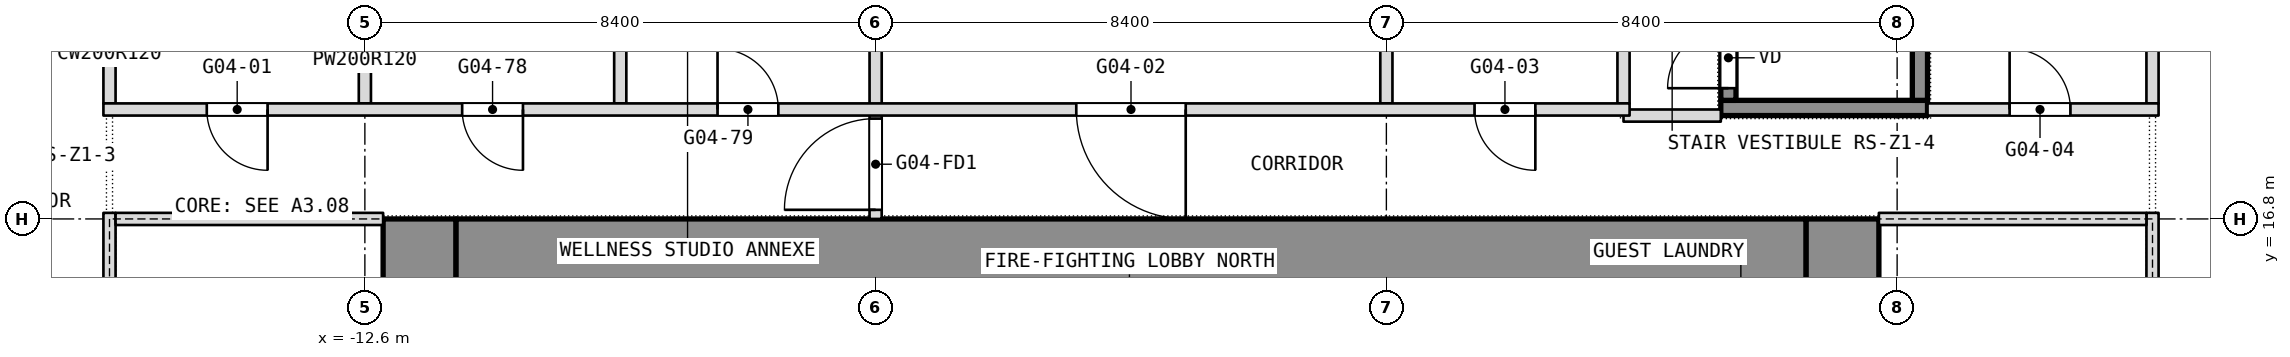
"""IFC4 building model, lengths in metres.
Left out: names, types, materials, properties, quantities, classifications, styles, units other than length and angle.
Written with IfcOpenShell. Run it as: python <this file> out.ifc"""

import sys

from ifc_helpers import new_model, si_unit, direction, frame, frame_2d, origin, place, context, subcontext, project, spatial, rectangle, extrude, element, fill, save


model = new_model("IFC4")
c1 = context("Model", 3, precision=1e-05, world=origin(), true_north=direction((0.0, 1.0)))
c2 = subcontext(c1, "Body", "Model", "MODEL_VIEW")
j1 = project(units=[si_unit("LENGTHUNIT", "METRE"), si_unit("PLANEANGLEUNIT", "RADIAN")], contexts=[c1])
p1 = place(None, origin())
s1 = spatial("IfcSite", under=j1, at=p1, CompositionType="ELEMENT")
p2 = place(p1, origin())
s2 = spatial("IfcBuilding", under=s1, at=p2, CompositionType="ELEMENT")
p3 = place(p2, frame((0.0, 0.0, 54.5)))
s3 = spatial("IfcBuildingStorey", under=s2, at=p3, CompositionType="ELEMENT", Elevation=54.5)
p4 = place(p3, frame((11.7, 0.0, 0.0), z_axis=(0.0, 0.0, 1.0), x_axis=(0.0, 1.0, 0.0)))
e1 = element("IfcWall", 1, at=p4, inside=s3, PredefinedType="SHEAR", context=c2, shape_type="SweptSolid", body=[
    extrude(rectangle(XDim=16.8, YDim=1.2, at=frame_2d((8.4, 0.0))), origin(), (0.0, 0.0, 1.0), 3.6),
])
p5 = place(p4, frame((3.6, 0.0, 0.0)))
e2 = element("IfcOpeningElement", 2, at=p5, cuts=e1, PredefinedType="OPENING", context=c2, shape_type="SweptSolid", body=[
    extrude(rectangle(XDim=0.9, YDim=2.1, at=frame_2d((0.45, 1.05))), frame((0.0, 0.6, 0.0), z_axis=(0.0, -1.0, 0.0), x_axis=(1.0, 0.0, 0.0)), (0.0, 0.0, 1.0), 1.2),
])
p6 = place(p4, frame((6.825, 0.0, 0.0)))
e3 = element("IfcOpeningElement", 3, at=p6, cuts=e1, PredefinedType="OPENING", context=c2, shape_type="SweptSolid", body=[
    extrude(rectangle(XDim=1.2, YDim=2.1, at=frame_2d((0.6, 1.05))), frame((0.0, 0.6, 0.0), z_axis=(0.0, -1.0, 0.0), x_axis=(1.0, 0.0, 0.0)), (0.0, 0.0, 1.0), 1.2),
])
p7 = place(p4, frame((12.3, 0.0, 0.0)))
e4 = element("IfcOpeningElement", 4, at=p7, cuts=e1, PredefinedType="OPENING", context=c2, shape_type="SweptSolid", body=[
    extrude(rectangle(XDim=0.9, YDim=2.1, at=frame_2d((0.45, 1.05))), frame((0.0, 0.6, 0.0), z_axis=(0.0, -1.0, 0.0), x_axis=(1.0, 0.0, 0.0)), (0.0, 0.0, 1.0), 1.2),
])
p8 = place(p4, frame((8.775, 0.0, 0.0)))
e5 = element("IfcOpeningElement", 5, at=p8, cuts=e1, PredefinedType="OPENING", context=c2, shape_type="SweptSolid", body=[
    extrude(rectangle(XDim=1.2, YDim=2.1, at=frame_2d((0.6, 1.05))), frame((0.0, 0.6, 0.0), z_axis=(0.0, -1.0, 0.0), x_axis=(1.0, 0.0, 0.0)), (0.0, 0.0, 1.0), 1.2),
])
p9 = place(p3, frame((-11.7, 0.0, 0.0), z_axis=(0.0, 0.0, 1.0), x_axis=(0.0, 1.0, 0.0)))
e6 = element("IfcWall", 6, at=p9, inside=s3, PredefinedType="SHEAR", context=c2, shape_type="SweptSolid", body=[
    extrude(rectangle(XDim=16.8, YDim=1.2, at=frame_2d((8.4, 0.0))), origin(), (0.0, 0.0, 1.0), 3.6),
])
p10 = place(p9, frame((2.3, 0.0, 0.0)))
e7 = element("IfcOpeningElement", 7, at=p10, cuts=e6, PredefinedType="OPENING", context=c2, shape_type="SweptSolid", body=[
    extrude(rectangle(XDim=1.1, YDim=2.1, at=frame_2d((0.55, 1.05))), frame((0.0, 0.6, 0.0), z_axis=(0.0, -1.0, 0.0), x_axis=(1.0, 0.0, 0.0)), (0.0, 0.0, 1.0), 1.2),
])
p11 = place(p9, frame((4.85, 0.0, 0.0)))
e8 = element("IfcOpeningElement", 8, at=p11, cuts=e6, PredefinedType="OPENING", context=c2, shape_type="SweptSolid", body=[
    extrude(rectangle(XDim=1.1, YDim=2.1, at=frame_2d((0.55, 1.05))), frame((0.0, 0.6, 0.0), z_axis=(0.0, -1.0, 0.0), x_axis=(1.0, 0.0, 0.0)), (0.0, 0.0, 1.0), 1.2),
])
p12 = place(p9, frame((6.825, 0.0, 0.0)))
e9 = element("IfcOpeningElement", 9, at=p12, cuts=e6, PredefinedType="OPENING", context=c2, shape_type="SweptSolid", body=[
    extrude(rectangle(XDim=1.2, YDim=2.1, at=frame_2d((0.6, 1.05))), frame((0.0, 0.6, 0.0), z_axis=(0.0, -1.0, 0.0), x_axis=(1.0, 0.0, 0.0)), (0.0, 0.0, 1.0), 1.2),
])
p13 = place(p9, frame((13.4, 0.0, 0.0)))
e10 = element("IfcOpeningElement", 10, at=p13, cuts=e6, PredefinedType="OPENING", context=c2, shape_type="SweptSolid", body=[
    extrude(rectangle(XDim=1.1, YDim=2.1, at=frame_2d((0.55, 1.05))), frame((0.0, 0.6, 0.0), z_axis=(0.0, -1.0, 0.0), x_axis=(1.0, 0.0, 0.0)), (0.0, 0.0, 1.0), 1.2),
])
p14 = place(p9, frame((10.85, 0.0, 0.0)))
e11 = element("IfcOpeningElement", 11, at=p14, cuts=e6, PredefinedType="OPENING", context=c2, shape_type="SweptSolid", body=[
    extrude(rectangle(XDim=1.1, YDim=2.1, at=frame_2d((0.55, 1.05))), frame((0.0, 0.6, 0.0), z_axis=(0.0, -1.0, 0.0), x_axis=(1.0, 0.0, 0.0)), (0.0, 0.0, 1.0), 1.2),
])
p15 = place(p9, frame((8.775, 0.0, 0.0)))
e12 = element("IfcOpeningElement", 12, at=p15, cuts=e6, PredefinedType="OPENING", context=c2, shape_type="SweptSolid", body=[
    extrude(rectangle(XDim=1.2, YDim=2.1, at=frame_2d((0.6, 1.05))), frame((0.0, 0.6, 0.0), z_axis=(0.0, -1.0, 0.0), x_axis=(1.0, 0.0, 0.0)), (0.0, 0.0, 1.0), 1.2),
])
p16 = place(p3, frame((-11.1, 16.2, 0.0), z_axis=(0.0, 0.0, 1.0), x_axis=(1.0, 0.0, 0.0)))
e13 = element("IfcWall", 13, at=p16, inside=s3, PredefinedType="SHEAR", context=c2, shape_type="SweptSolid", body=[
    extrude(rectangle(XDim=22.2, YDim=1.2, at=frame_2d((11.1, 0.0))), origin(), (0.0, 0.0, 1.0), 3.6),
])
p17 = place(p3, frame((16.8, 18.7, 0.0), z_axis=(0.0, 0.0, 1.0), x_axis=(0.0, 1.0, 0.0)))
e14 = element("IfcWall", 14, at=p17, inside=s3, PredefinedType="PARTITIONING", context=c2, shape_type="SweptSolid", body=[
    extrude(rectangle(XDim=3.0, YDim=0.2, at=frame_2d((1.5, 0.0))), origin(), (0.0, 0.0, 1.0), 3.34),
])
for number, where, z_axis, x_axis in (
    (15, (8.1, 18.7, 0.0), (0.0, 0.0, 1.0), (0.0, 1.0, 0.0)),
    (16, (4.2, 18.7, 0.0), (0.0, 0.0, 1.0), (0.0, 1.0, 0.0)),
):
    element("IfcWall", number, at=place(p3, frame(where, z_axis=z_axis, x_axis=x_axis)), inside=s3, PredefinedType="PARTITIONING", context=c2, shape_type="SweptSolid", body=[
        extrude(rectangle(XDim=2.8, YDim=0.2, at=frame_2d((1.4, 0.0))), origin(), (0.0, 0.0, 1.0), 3.34),
    ])
p18 = place(p3, frame((-4.2, 16.8, 0.0), z_axis=(0.0, 0.0, 1.0), x_axis=(0.0, 1.0, 0.0)))
e17 = element("IfcWall", 17, at=p18, inside=s3, PredefinedType="PARTITIONING", context=c2, shape_type="SweptSolid", body=[
    extrude(rectangle(XDim=6.7, YDim=0.2, at=frame_2d((3.35, 0.0))), origin(), (0.0, 0.0, 1.0), 3.34),
])
p19 = place(p18, frame((0.15, 0.0, 0.0)))
e18 = element("IfcOpeningElement", 18, at=p19, cuts=e17, PredefinedType="OPENING", context=c2, shape_type="SweptSolid", body=[
    extrude(rectangle(XDim=1.5, YDim=2.1, at=frame_2d((0.75, 1.05))), frame((0.0, 0.1, 0.0), z_axis=(0.0, -1.0, 0.0), x_axis=(1.0, 0.0, 0.0)), (0.0, 0.0, 1.0), 0.2),
])
p20 = place(p18, frame((4.95, 0.0, 0.0)))
e19 = element("IfcOpeningElement", 19, at=p20, cuts=e17, PredefinedType="OPENING", context=c2, shape_type="SweptSolid", body=[
    extrude(rectangle(XDim=1.5, YDim=2.1, at=frame_2d((0.75, 1.05))), frame((0.0, 0.1, 0.0), z_axis=(0.0, -1.0, 0.0), x_axis=(1.0, 0.0, 0.0)), (0.0, 0.0, 1.0), 0.2),
])
for number, where, z_axis, x_axis in (
    (20, (-8.4, 18.7, 0.0), (0.0, 0.0, 1.0), (0.0, 1.0, 0.0)),
    (21, (-12.6, 18.7, 0.0), (0.0, 0.0, 1.0), (0.0, 1.0, 0.0)),
):
    element("IfcWall", number, at=place(p3, frame(where, z_axis=z_axis, x_axis=x_axis)), inside=s3, PredefinedType="PARTITIONING", context=c2, shape_type="SweptSolid", body=[
        extrude(rectangle(XDim=2.8, YDim=0.2, at=frame_2d((1.4, 0.0))), origin(), (0.0, 0.0, 1.0), 3.34),
    ])
p21 = place(p3, frame((-16.8, 18.7, 0.0), z_axis=(0.0, 0.0, 1.0), x_axis=(0.0, 1.0, 0.0)))
e22 = element("IfcWall", 22, at=p21, inside=s3, PredefinedType="PARTITIONING", context=c2, shape_type="SweptSolid", body=[
    extrude(rectangle(XDim=3.0, YDim=0.2, at=frame_2d((1.5, 0.0))), origin(), (0.0, 0.0, 1.0), 3.34),
])
p22 = place(p3, frame((8.1, 18.5, 0.0), z_axis=(0.0, 0.0, 1.0), x_axis=(1.0, 0.0, 0.0)))
e23 = element("IfcWall", 23, at=p22, inside=s3, PredefinedType="PARTITIONING", context=c2, shape_type="SweptSolid", body=[
    extrude(rectangle(XDim=1.6, YDim=0.2, at=frame_2d((0.8, 0.0))), origin(), (0.0, 0.0, 1.0), 3.34),
])
p23 = place(p3, frame((-16.9, 18.6, 0.0), z_axis=(0.0, 0.0, 1.0), x_axis=(1.0, 0.0, 0.0)))
e24 = element("IfcWall", 24, at=p23, inside=s3, PredefinedType="PARTITIONING", context=c2, shape_type="SweptSolid", body=[
    extrude(rectangle(XDim=25.1, YDim=0.2, at=frame_2d((12.55, 0.0))), origin(), (0.0, 0.0, 1.0), 3.34),
])
p24 = place(p23, frame((1.7, 0.0, 0.0)))
e25 = element("IfcOpeningElement", 25, at=p24, cuts=e24, PredefinedType="OPENING", context=c2, shape_type="SweptSolid", body=[
    extrude(rectangle(XDim=1.0, YDim=2.1, at=frame_2d((0.5, 1.05))), frame((0.0, 0.1, 0.0), z_axis=(0.0, -1.0, 0.0), x_axis=(1.0, 0.0, 0.0)), (0.0, 0.0, 1.0), 0.2),
])
p25 = place(p23, frame((16.0, 0.0, 0.0)))
e26 = element("IfcOpeningElement", 26, at=p25, cuts=e24, PredefinedType="OPENING", context=c2, shape_type="SweptSolid", body=[
    extrude(rectangle(XDim=1.8, YDim=2.1, at=frame_2d((0.9, 1.05))), frame((0.0, 0.1, 0.0), z_axis=(0.0, -1.0, 0.0), x_axis=(1.0, 0.0, 0.0)), (0.0, 0.0, 1.0), 0.2),
])
p26 = place(p23, frame((22.55, 0.0, 0.0)))
e27 = element("IfcOpeningElement", 27, at=p26, cuts=e24, PredefinedType="OPENING", context=c2, shape_type="SweptSolid", body=[
    extrude(rectangle(XDim=1.0, YDim=2.1, at=frame_2d((0.5, 1.05))), frame((0.0, 0.1, 0.0), z_axis=(0.0, -1.0, 0.0), x_axis=(1.0, 0.0, 0.0)), (0.0, 0.0, 1.0), 0.2),
])
p27 = place(p23, frame((5.9, 0.0, 0.0)))
e28 = element("IfcOpeningElement", 28, at=p27, cuts=e24, PredefinedType="OPENING", context=c2, shape_type="SweptSolid", body=[
    extrude(rectangle(XDim=1.0, YDim=2.1, at=frame_2d((0.5, 1.05))), frame((0.0, 0.1, 0.0), z_axis=(0.0, -1.0, 0.0), x_axis=(1.0, 0.0, 0.0)), (0.0, 0.0, 1.0), 0.2),
])
p28 = place(p23, frame((10.1, 0.0, 0.0)))
e29 = element("IfcOpeningElement", 29, at=p28, cuts=e24, PredefinedType="OPENING", context=c2, shape_type="SweptSolid", body=[
    extrude(rectangle(XDim=1.0, YDim=2.1, at=frame_2d((0.5, 1.05))), frame((0.0, 0.1, 0.0), z_axis=(0.0, -1.0, 0.0), x_axis=(1.0, 0.0, 0.0)), (0.0, 0.0, 1.0), 0.2),
])
p29 = place(p3, frame((13.1, 18.6, 0.0), z_axis=(0.0, 0.0, 1.0), x_axis=(1.0, 0.0, 0.0)))
e30 = element("IfcWall", 30, at=p29, inside=s3, PredefinedType="PARTITIONING", context=c2, shape_type="SweptSolid", body=[
    extrude(rectangle(XDim=3.8, YDim=0.2, at=frame_2d((1.9, 0.0))), origin(), (0.0, 0.0, 1.0), 3.34),
])
p30 = place(p29, frame((1.35, 0.0, 0.0)))
e31 = element("IfcOpeningElement", 31, at=p30, cuts=e30, PredefinedType="OPENING", context=c2, shape_type="SweptSolid", body=[
    extrude(rectangle(XDim=1.0, YDim=2.1, at=frame_2d((0.5, 1.05))), frame((0.0, 0.1, 0.0), z_axis=(0.0, -1.0, 0.0), x_axis=(1.0, 0.0, 0.0)), (0.0, 0.0, 1.0), 0.2),
])
p31 = place(p3, frame((-16.8, -0.1, 0.0), z_axis=(0.0, 0.0, 1.0), x_axis=(0.0, 1.0, 0.0)))
e32 = element("IfcWall", 32, at=p31, inside=s3, PredefinedType="PARTITIONING", context=c2, shape_type="SweptSolid", body=[
    extrude(rectangle(XDim=17.0, YDim=0.2, at=frame_2d((8.5, 0.0))), origin(), (0.0, 0.0, 1.0), 3.34),
])
p32 = place(p31, frame((2.2, 0.0, 0.0)))
e33 = element("IfcOpeningElement", 33, at=p32, cuts=e32, PredefinedType="OPENING", context=c2, shape_type="SweptSolid", body=[
    extrude(rectangle(XDim=1.8, YDim=2.1, at=frame_2d((0.9, 1.05))), frame((0.0, 0.1, 0.0), z_axis=(0.0, -1.0, 0.0), x_axis=(1.0, 0.0, 0.0)), (0.0, 0.0, 1.0), 0.2),
])
p33 = place(p31, frame((7.2, 0.0, 0.0)))
e34 = element("IfcOpeningElement", 34, at=p33, cuts=e32, PredefinedType="OPENING", context=c2, shape_type="SweptSolid", body=[
    extrude(rectangle(XDim=1.8, YDim=2.1, at=frame_2d((0.9, 1.05))), frame((0.0, 0.1, 0.0), z_axis=(0.0, -1.0, 0.0), x_axis=(1.0, 0.0, 0.0)), (0.0, 0.0, 1.0), 0.2),
])
p34 = place(p3, frame((-16.7, 16.8, 0.0), z_axis=(0.0, 0.0, 1.0), x_axis=(1.0, 0.0, 0.0)))
e35 = element("IfcWall", 35, at=p34, inside=s3, PredefinedType="PARTITIONING", context=c2, shape_type="SweptSolid", body=[
    extrude(rectangle(XDim=4.4, YDim=0.2, at=frame_2d((2.2, 0.0))), origin(), (0.0, 0.0, 1.0), 2.84),
])
p35 = place(p3, frame((16.8, -0.1, 0.0), z_axis=(0.0, 0.0, 1.0), x_axis=(0.0, 1.0, 0.0)))
e36 = element("IfcWall", 36, at=p35, inside=s3, PredefinedType="PARTITIONING", context=c2, shape_type="SweptSolid", body=[
    extrude(rectangle(XDim=17.0, YDim=0.2, at=frame_2d((8.5, 0.0))), origin(), (0.0, 0.0, 1.0), 3.34),
])
p36 = place(p35, frame((2.2, 0.0, 0.0)))
e37 = element("IfcOpeningElement", 37, at=p36, cuts=e36, PredefinedType="OPENING", context=c2, shape_type="SweptSolid", body=[
    extrude(rectangle(XDim=1.8, YDim=2.1, at=frame_2d((0.9, 1.05))), frame((0.0, 0.1, 0.0), z_axis=(0.0, -1.0, 0.0), x_axis=(1.0, 0.0, 0.0)), (0.0, 0.0, 1.0), 0.2),
])
p37 = place(p35, frame((13.0, 0.0, 0.0)))
e38 = element("IfcOpeningElement", 38, at=p37, cuts=e36, PredefinedType="OPENING", context=c2, shape_type="SweptSolid", body=[
    extrude(rectangle(XDim=1.8, YDim=2.1, at=frame_2d((0.9, 1.05))), frame((0.0, 0.1, 0.0), z_axis=(0.0, -1.0, 0.0), x_axis=(1.0, 0.0, 0.0)), (0.0, 0.0, 1.0), 0.2),
])
p38 = place(p3, frame((12.3, 16.8, 0.0), z_axis=(0.0, 0.0, 1.0), x_axis=(1.0, 0.0, 0.0)))
e39 = element("IfcWall", 39, at=p38, inside=s3, PredefinedType="PARTITIONING", context=c2, shape_type="SweptSolid", body=[
    extrude(rectangle(XDim=4.4, YDim=0.2, at=frame_2d((2.2, 0.0))), origin(), (0.0, 0.0, 1.0), 2.84),
])
p39 = place(p3, frame((9.7, 18.625, 0.1), z_axis=(0.0, 0.0, 1.0), x_axis=(1.0, 0.0, 0.0)))
e40 = element("IfcWall", 40, at=p39, inside=s3, PredefinedType="SHEAR", context=c2, shape_type="SweptSolid", body=[
    extrude(rectangle(XDim=3.4, YDim=0.25, at=frame_2d((1.7, 0.0))), origin(), (0.0, 0.0, 1.0), 3.6),
])
p40 = place(p3, frame((9.825, 18.75, 0.1), z_axis=(0.0, 0.0, 1.0), x_axis=(0.0, 1.0, 0.0)))
e41 = element("IfcWall", 41, at=p40, inside=s3, PredefinedType="SHEAR", context=c2, shape_type="SweptSolid", body=[
    extrude(rectangle(XDim=5.7, YDim=0.25, at=frame_2d((2.85, 0.0))), origin(), (0.0, 0.0, 1.0), 3.6),
])
p41 = place(p40, frame((0.2, 0.0, 0.0)))
e42 = element("IfcOpeningElement", 42, at=p41, cuts=e41, PredefinedType="OPENING", context=c2, shape_type="SweptSolid", body=[
    extrude(rectangle(XDim=1.0, YDim=2.1, at=frame_2d((0.5, 1.05))), frame((0.0, 0.125, 0.0), z_axis=(0.0, -1.0, 0.0), x_axis=(1.0, 0.0, 0.0)), (0.0, 0.0, 1.0), 0.25),
])
p42 = place(p3, frame((12.975, 18.75, 0.1), z_axis=(0.0, 0.0, 1.0), x_axis=(0.0, 1.0, 0.0)))
e43 = element("IfcWall", 43, at=p42, inside=s3, PredefinedType="SHEAR", context=c2, shape_type="SweptSolid", body=[
    extrude(rectangle(XDim=5.7, YDim=0.25, at=frame_2d((2.85, 0.0))), origin(), (0.0, 0.0, 1.0), 3.6),
])
p43 = place(p24, origin())
e44 = element("IfcDoor", 44, at=p43, inside=s3, OperationType="SINGLE_SWING_RIGHT", PredefinedType="DOOR", context=c2, shape_type="SweptSolid", body=[
    extrude(rectangle(XDim=1.0, YDim=2.1, at=frame_2d((0.5, 1.05))), frame((0.0, 0.025, 0.0), z_axis=(0.0, -1.0, 0.0), x_axis=(1.0, 0.0, 0.0)), (0.0, 0.0, 1.0), 0.05),
])
fill(e25, e44)
p44 = place(p25, origin())
e45 = element("IfcDoor", 45, at=p44, inside=s3, OperationType="DOUBLE_DOOR_SINGLE_SWING", PredefinedType="DOOR", context=c2, shape_type="SweptSolid", body=[
    extrude(rectangle(XDim=1.8, YDim=2.1, at=frame_2d((0.9, 1.05))), frame((0.0, 0.025, 0.0), z_axis=(0.0, -1.0, 0.0), x_axis=(1.0, 0.0, 0.0)), (0.0, 0.0, 1.0), 0.05),
])
fill(e26, e45)
p45 = place(p26, origin())
e46 = element("IfcDoor", 46, at=p45, inside=s3, OperationType="SINGLE_SWING_LEFT", PredefinedType="DOOR", context=c2, shape_type="SweptSolid", body=[
    extrude(rectangle(XDim=1.0, YDim=2.1, at=frame_2d((0.5, 1.05))), frame((0.0, 0.025, 0.0), z_axis=(0.0, -1.0, 0.0), x_axis=(1.0, 0.0, 0.0)), (0.0, 0.0, 1.0), 0.05),
])
fill(e27, e46)
p46 = place(p27, origin())
e47 = element("IfcDoor", 47, at=p46, inside=s3, OperationType="SINGLE_SWING_RIGHT", PredefinedType="DOOR", context=c2, shape_type="SweptSolid", body=[
    extrude(rectangle(XDim=1.0, YDim=2.1, at=frame_2d((0.5, 1.05))), frame((0.0, 0.025, 0.0), z_axis=(0.0, -1.0, 0.0), x_axis=(1.0, 0.0, 0.0)), (0.0, 0.0, 1.0), 0.05),
])
fill(e28, e47)
p47 = place(p28, origin())
e48 = element("IfcDoor", 48, at=p47, inside=s3, OperationType="SINGLE_SWING_LEFT", PredefinedType="DOOR", context=c2, shape_type="SweptSolid", body=[
    extrude(rectangle(XDim=1.0, YDim=2.1, at=frame_2d((0.5, 1.05))), frame((0.0, 0.025, 0.0), z_axis=(0.0, -1.0, 0.0), x_axis=(1.0, 0.0, 0.0)), (0.0, 0.0, 1.0), 0.05),
])
fill(e29, e48)
p48 = place(p30, origin())
e49 = element("IfcDoor", 49, at=p48, inside=s3, OperationType="SINGLE_SWING_LEFT", PredefinedType="DOOR", context=c2, shape_type="SweptSolid", body=[
    extrude(rectangle(XDim=1.0, YDim=2.1, at=frame_2d((0.5, 1.05))), frame((0.0, 0.025, 0.0), z_axis=(0.0, -1.0, 0.0), x_axis=(1.0, 0.0, 0.0)), (0.0, 0.0, 1.0), 0.05),
])
fill(e31, e49)
p49 = place(p41, origin())
e50 = element("IfcDoor", 50, at=p49, inside=s3, OperationType="SINGLE_SWING_LEFT", PredefinedType="DOOR", context=c2, shape_type="SweptSolid", body=[
    extrude(rectangle(XDim=1.0, YDim=2.1, at=frame_2d((0.5, 1.05))), frame((0.0, 0.025, 0.0), z_axis=(0.0, -1.0, 0.0), x_axis=(1.0, 0.0, 0.0)), (0.0, 0.0, 1.0), 0.05),
])
fill(e42, e50)
p50 = place(p19, origin())
e51 = element("IfcDoor", 51, at=p50, inside=s3, OperationType="DOUBLE_DOOR_DOUBLE_SWING", PredefinedType="DOOR", context=c2, shape_type="SweptSolid", body=[
    extrude(rectangle(XDim=1.5, YDim=2.1, at=frame_2d((0.75, 1.05))), frame((0.0, 0.025, 0.0), z_axis=(0.0, -1.0, 0.0), x_axis=(1.0, 0.0, 0.0)), (0.0, 0.0, 1.0), 0.05),
])
fill(e18, e51)
save(model, sys.argv[1])
